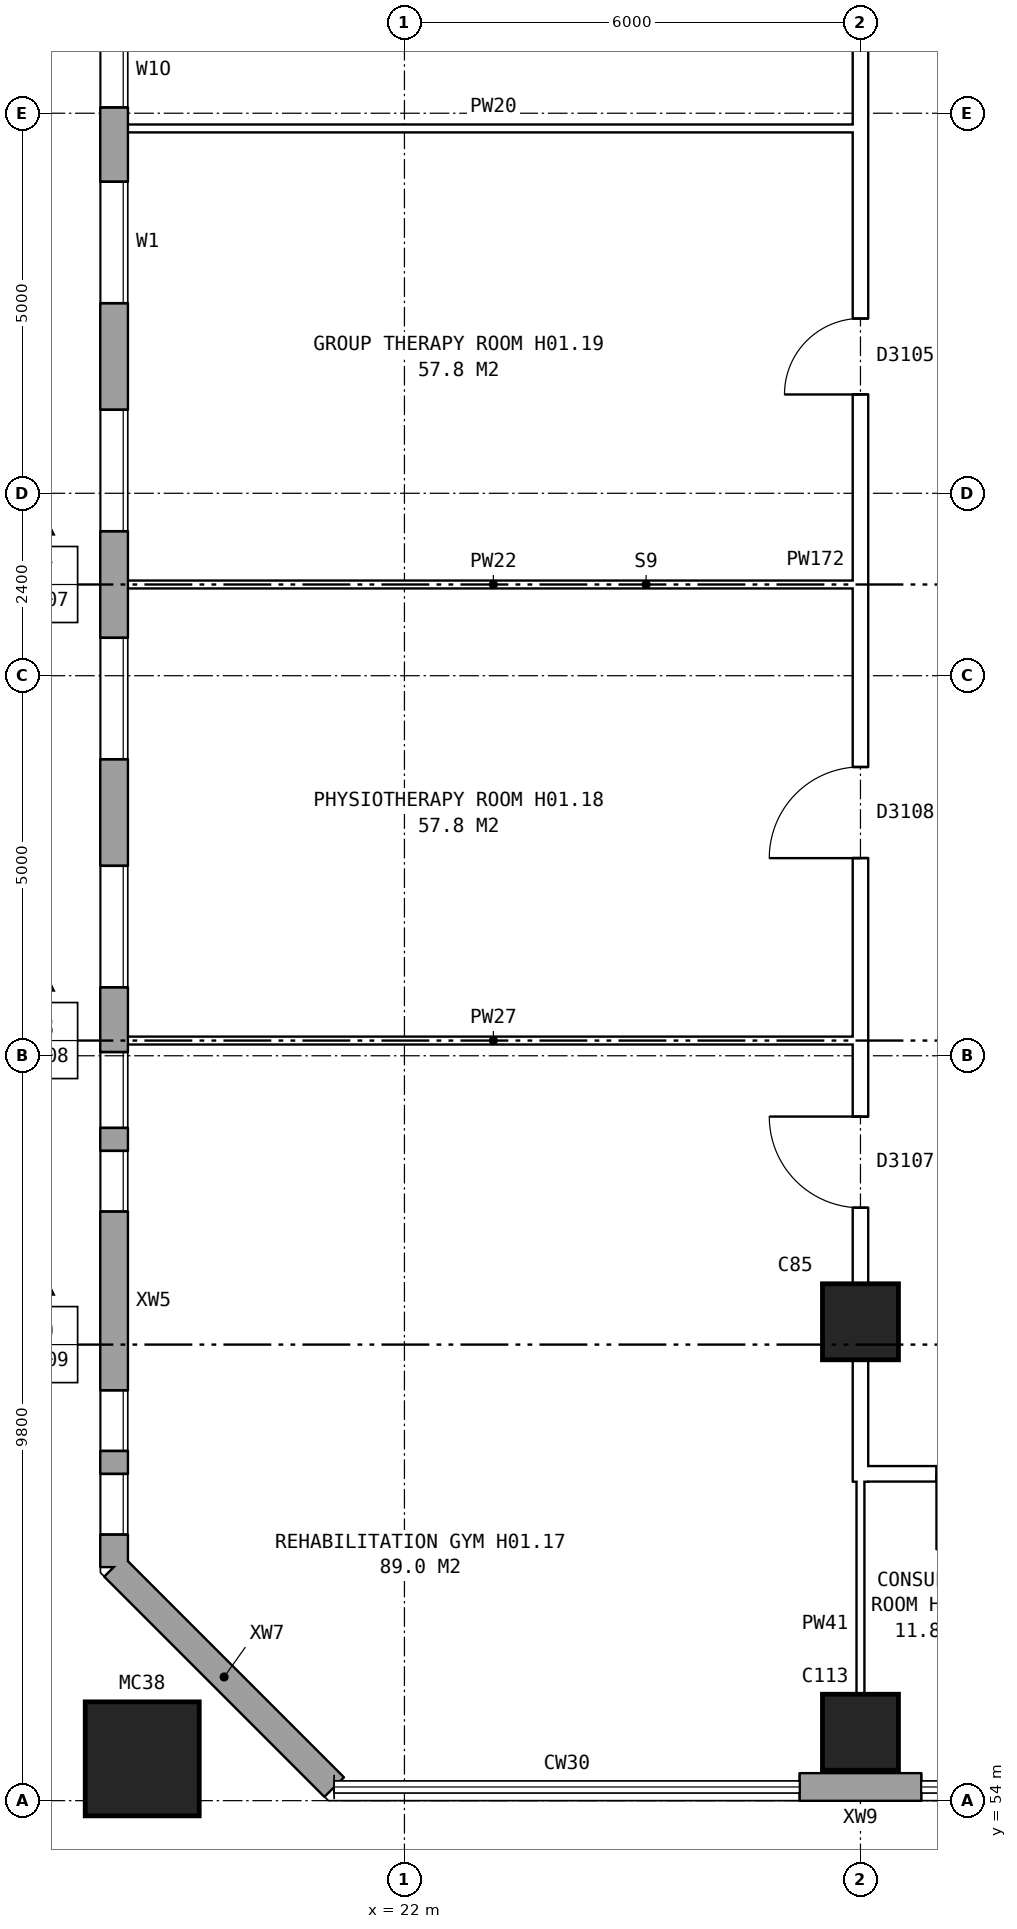
"""IFC4 building model, lengths in metres.
Left out: names, types, materials, properties, quantities, classifications, styles, units other than length and angle.
Written with IfcOpenShell. Run it as: python <this file> out.ifc"""

import sys

from ifc_helpers import new_model, si_unit, direction, frame, frame_2d, origin, origin_2d, place, context, subcontext, project, spatial, rectangle, hollow_rectangle, extrude, element, fill, save


model = new_model("IFC4")
c1 = context("Model", 3, precision=1e-05, world=origin(), true_north=direction((0.0, 1.0)))
c2 = subcontext(c1, "Body", "Model", "MODEL_VIEW")
j1 = project(units=[si_unit("LENGTHUNIT", "METRE"), si_unit("PLANEANGLEUNIT", "RADIAN")], contexts=[c1])
p1 = place(None, origin())
s1 = spatial("IfcSite", under=j1, at=p1, CompositionType="ELEMENT")
p2 = place(p1, origin())
s2 = spatial("IfcBuilding", under=s1, at=p2, CompositionType="ELEMENT")
p3 = place(p2, frame((0.0, 0.0, 5.5)))
s3 = spatial("IfcBuildingStorey", under=s2, at=p3, CompositionType="ELEMENT", Elevation=5.5)
for number, where, z_axis, x_axis in (
    (1, (28.0, 54.9, 0.0), (0.0, 0.0, 1.0), (1.0, 0.0, 0.0)),
    (2, (28.0, 60.3, 0.0), (0.0, 0.0, 1.0), (1.0, 0.0, 0.0)),
):
    element("IfcColumn", number, at=place(p3, frame(where, z_axis=z_axis, x_axis=x_axis)), inside=s3, PredefinedType="COLUMN", context=c2, shape_type="SweptSolid", body=[
        extrude(rectangle(XDim=1.0, YDim=1.0, at=origin_2d()), origin(), (0.0, 0.0, 1.0), 4.3),
    ])
p4 = place(p3, frame((18.55, 54.55, 0.0), z_axis=(0.0, 0.0, 1.0), x_axis=(1.0, 0.0, 0.0)))
e3 = element("IfcColumn", 3, at=p4, inside=s3, PredefinedType="COLUMN", context=c2, shape_type="SweptSolid", body=[
    extrude(hollow_rectangle(XDim=1.5, YDim=1.5, WallThickness=0.08, at=origin_2d()), origin(), (0.0, 0.0, 1.0), 4.6),
])
p5 = place(p3, frame((18.18, 57.075, 0.0), z_axis=(0.0, 0.0, 1.0), x_axis=(0.707106781187, -0.707106781187, 0.0)))
e4 = element("IfcWall", 4, at=p5, inside=s3, PredefinedType="STANDARD", context=c2, shape_type="SweptSolid", body=[
    extrude(rectangle(XDim=4.094, YDim=0.36, at=frame_2d((2.047, 0.0))), origin(), (0.0, 0.0, 1.0), 4.3),
])
p6 = place(p3, frame((27.2, 54.18, 0.0), z_axis=(0.0, 0.0, 1.0), x_axis=(1.0, 0.0, 0.0)))
e5 = element("IfcWall", 5, at=p6, inside=s3, PredefinedType="STANDARD", context=c2, shape_type="SweptSolid", body=[
    extrude(rectangle(XDim=1.6, YDim=0.36, at=frame_2d((0.8, 0.0))), origin(), (0.0, 0.0, 1.0), 4.3),
])
p7 = place(p3, frame((18.18, 82.925, 0.0), z_axis=(0.0, 0.0, 1.0), x_axis=(0.0, -1.0, 0.0)))
e6 = element("IfcWall", 6, at=p7, inside=s3, PredefinedType="STANDARD", context=c2, shape_type="SweptSolid", body=[
    extrude(rectangle(XDim=25.851, YDim=0.36, at=frame_2d((12.925, 0.0))), origin(), (0.0, 0.0, 1.0), 4.3),
])
p8 = place(p7, frame((0.3, 0.0, 1.4)))
e7 = element("IfcOpeningElement", 7, at=p8, cuts=e6, PredefinedType="OPENING", context=c2, shape_type="SweptSolid", body=[
    extrude(rectangle(XDim=0.8, YDim=1.2, at=frame_2d((0.4, 0.6))), frame((0.0, 0.19, 0.0), z_axis=(0.0, -1.0, 0.0), x_axis=(1.0, 0.0, 0.0)), (0.0, 0.0, 1.0), 0.38),
])
p9 = place(p7, frame((1.4, 0.0, 1.7)))
e8 = element("IfcOpeningElement", 8, at=p9, cuts=e6, PredefinedType="OPENING", context=c2, shape_type="SweptSolid", body=[
    extrude(rectangle(XDim=0.8, YDim=0.9, at=frame_2d((0.4, 0.45))), frame((0.0, 0.19, 0.0), z_axis=(0.0, -1.0, 0.0), x_axis=(1.0, 0.0, 0.0)), (0.0, 0.0, 1.0), 0.38),
])
p10 = place(p7, frame((7.625, 0.0, 0.8)))
e9 = element("IfcOpeningElement", 9, at=p10, cuts=e6, PredefinedType="OPENING", context=c2, shape_type="SweptSolid", body=[
    extrude(rectangle(XDim=1.6, YDim=1.8, at=frame_2d((0.8, 0.9))), frame((0.0, 0.19, 0.0), z_axis=(0.0, -1.0, 0.0), x_axis=(1.0, 0.0, 0.0)), (0.0, 0.0, 1.0), 0.38),
])
p11 = place(p7, frame((10.625, 0.0, 0.8)))
e10 = element("IfcOpeningElement", 10, at=p11, cuts=e6, PredefinedType="OPENING", context=c2, shape_type="SweptSolid", body=[
    extrude(rectangle(XDim=1.6, YDim=1.8, at=frame_2d((0.8, 0.9))), frame((0.0, 0.19, 0.0), z_axis=(0.0, -1.0, 0.0), x_axis=(1.0, 0.0, 0.0)), (0.0, 0.0, 1.0), 0.38),
])
p12 = place(p7, frame((13.625, 0.0, 0.8)))
e11 = element("IfcOpeningElement", 11, at=p12, cuts=e6, PredefinedType="OPENING", context=c2, shape_type="SweptSolid", body=[
    extrude(rectangle(XDim=1.6, YDim=1.8, at=frame_2d((0.8, 0.9))), frame((0.0, 0.19, 0.0), z_axis=(0.0, -1.0, 0.0), x_axis=(1.0, 0.0, 0.0)), (0.0, 0.0, 1.0), 0.38),
])
p13 = place(p7, frame((16.625, 0.0, 0.8)))
e12 = element("IfcOpeningElement", 12, at=p13, cuts=e6, PredefinedType="OPENING", context=c2, shape_type="SweptSolid", body=[
    extrude(rectangle(XDim=1.6, YDim=1.8, at=frame_2d((0.8, 0.9))), frame((0.0, 0.19, 0.0), z_axis=(0.0, -1.0, 0.0), x_axis=(1.0, 0.0, 0.0)), (0.0, 0.0, 1.0), 0.38),
])
p14 = place(p7, frame((19.075, 0.0, 0.8)))
e13 = element("IfcOpeningElement", 13, at=p14, cuts=e6, PredefinedType="OPENING", context=c2, shape_type="SweptSolid", body=[
    extrude(rectangle(XDim=1.0, YDim=1.2, at=frame_2d((0.5, 0.6))), frame((0.0, 0.19, 0.0), z_axis=(0.0, -1.0, 0.0), x_axis=(1.0, 0.0, 0.0)), (0.0, 0.0, 1.0), 0.38),
])
p15 = place(p7, frame((20.375, 0.0, 0.8)))
e14 = element("IfcOpeningElement", 14, at=p15, cuts=e6, PredefinedType="OPENING", context=c2, shape_type="SweptSolid", body=[
    extrude(rectangle(XDim=0.8, YDim=0.9, at=frame_2d((0.4, 0.45))), frame((0.0, 0.19, 0.0), z_axis=(0.0, -1.0, 0.0), x_axis=(1.0, 0.0, 0.0)), (0.0, 0.0, 1.0), 0.38),
])
p16 = place(p7, frame((4.55, 0.0, 0.8)))
e15 = element("IfcOpeningElement", 15, at=p16, cuts=e6, PredefinedType="OPENING", context=c2, shape_type="SweptSolid", body=[
    extrude(rectangle(XDim=0.8, YDim=0.9, at=frame_2d((0.4, 0.45))), frame((0.0, 0.19, 0.0), z_axis=(0.0, -1.0, 0.0), x_axis=(1.0, 0.0, 0.0)), (0.0, 0.0, 1.0), 0.38),
])
p17 = place(p7, frame((5.65, 0.0, 0.8)))
e16 = element("IfcOpeningElement", 16, at=p17, cuts=e6, PredefinedType="OPENING", context=c2, shape_type="SweptSolid", body=[
    extrude(rectangle(XDim=1.0, YDim=1.2, at=frame_2d((0.5, 0.6))), frame((0.0, 0.19, 0.0), z_axis=(0.0, -1.0, 0.0), x_axis=(1.0, 0.0, 0.0)), (0.0, 0.0, 1.0), 0.38),
])
p18 = place(p7, frame((23.525, 0.0, 1.7)))
e17 = element("IfcOpeningElement", 17, at=p18, cuts=e6, PredefinedType="OPENING", context=c2, shape_type="SweptSolid", body=[
    extrude(rectangle(XDim=0.8, YDim=0.9, at=frame_2d((0.4, 0.45))), frame((0.0, 0.19, 0.0), z_axis=(0.0, -1.0, 0.0), x_axis=(1.0, 0.0, 0.0)), (0.0, 0.0, 1.0), 0.38),
])
p19 = place(p7, frame((24.625, 0.0, 1.4)))
e18 = element("IfcOpeningElement", 18, at=p19, cuts=e6, PredefinedType="OPENING", context=c2, shape_type="SweptSolid", body=[
    extrude(rectangle(XDim=0.8, YDim=1.2, at=frame_2d((0.4, 0.6))), frame((0.0, 0.19, 0.0), z_axis=(0.0, -1.0, 0.0), x_axis=(1.0, 0.0, 0.0)), (0.0, 0.0, 1.0), 0.38),
])
p20 = place(p3, frame((27.9, 58.3, 0.0), z_axis=(0.0, 0.0, 1.0), x_axis=(1.0, 0.0, 0.0)))
e19 = element("IfcWall", 19, at=p20, inside=s3, PredefinedType="PARTITIONING", context=c2, shape_type="SweptSolid", body=[
    extrude(rectangle(XDim=16.12, YDim=0.2, at=frame_2d((8.06, 0.0))), origin(), (0.0, 0.0, 1.0), 4.3),
])
p21 = place(p20, frame((1.1, 0.0, 0.0)))
e20 = element("IfcOpeningElement", 20, at=p21, cuts=e19, PredefinedType="OPENING", context=c2, shape_type="SweptSolid", body=[
    extrude(rectangle(XDim=1.0, YDim=2.1, at=frame_2d((0.5, 1.05))), frame((0.0, 0.11, 0.0), z_axis=(0.0, -1.0, 0.0), x_axis=(1.0, 0.0, 0.0)), (0.0, 0.0, 1.0), 0.22),
])
p22 = place(p20, frame((4.1, 0.0, 0.0)))
e21 = element("IfcOpeningElement", 21, at=p22, cuts=e19, PredefinedType="OPENING", context=c2, shape_type="SweptSolid", body=[
    extrude(rectangle(XDim=1.0, YDim=2.1, at=frame_2d((0.5, 1.05))), frame((0.0, 0.11, 0.0), z_axis=(0.0, -1.0, 0.0), x_axis=(1.0, 0.0, 0.0)), (0.0, 0.0, 1.0), 0.22),
])
p23 = place(p20, frame((7.1, 0.0, 0.0)))
e22 = element("IfcOpeningElement", 22, at=p23, cuts=e19, PredefinedType="OPENING", context=c2, shape_type="SweptSolid", body=[
    extrude(rectangle(XDim=1.0, YDim=2.1, at=frame_2d((0.5, 1.05))), frame((0.0, 0.11, 0.0), z_axis=(0.0, -1.0, 0.0), x_axis=(1.0, 0.0, 0.0)), (0.0, 0.0, 1.0), 0.22),
])
p24 = place(p20, frame((10.1, 0.0, 0.0)))
e23 = element("IfcOpeningElement", 23, at=p24, cuts=e19, PredefinedType="OPENING", context=c2, shape_type="SweptSolid", body=[
    extrude(rectangle(XDim=1.0, YDim=2.1, at=frame_2d((0.5, 1.05))), frame((0.0, 0.11, 0.0), z_axis=(0.0, -1.0, 0.0), x_axis=(1.0, 0.0, 0.0)), (0.0, 0.0, 1.0), 0.22),
])
p25 = place(p20, frame((13.55, 0.0, 0.0)))
e24 = element("IfcOpeningElement", 24, at=p25, cuts=e19, PredefinedType="OPENING", context=c2, shape_type="SweptSolid", body=[
    extrude(rectangle(XDim=1.0, YDim=2.1, at=frame_2d((0.5, 1.05))), frame((0.0, 0.11, 0.0), z_axis=(0.0, -1.0, 0.0), x_axis=(1.0, 0.0, 0.0)), (0.0, 0.0, 1.0), 0.22),
])
for number, where, z_axis, x_axis in (
    (25, (18.24, 64.0, 0.0), (0.0, 0.0, 1.0), (1.0, 0.0, 0.0)),
    (26, (18.24, 70.0, 0.0), (0.0, 0.0, 1.0), (1.0, 0.0, 0.0)),
    (27, (18.24, 76.0, 0.0), (0.0, 0.0, 1.0), (1.0, 0.0, 0.0)),
):
    element("IfcWall", number, at=place(p3, frame(where, z_axis=z_axis, x_axis=x_axis)), inside=s3, PredefinedType="PARTITIONING", context=c2, shape_type="SweptSolid", body=[
        extrude(rectangle(XDim=9.86, YDim=0.1, at=frame_2d((4.93, 0.0))), origin(), (0.0, 0.0, 1.0), 4.3),
    ])
p26 = place(p3, frame((28.0, 58.198, 0.0), z_axis=(0.0, 0.0, 1.0), x_axis=(0.0, 1.0, 0.0)))
e28 = element("IfcWall", 28, at=p26, inside=s3, PredefinedType="PARTITIONING", context=c2, shape_type="SweptSolid", body=[
    extrude(rectangle(XDim=23.604, YDim=0.2, at=frame_2d((11.802, 0.0))), origin(), (0.0, 0.0, 1.0), 4.3),
])
p27 = place(p26, frame((3.602, 0.0, 0.0)))
e29 = element("IfcOpeningElement", 29, at=p27, cuts=e28, PredefinedType="OPENING", context=c2, shape_type="SweptSolid", body=[
    extrude(rectangle(XDim=1.2, YDim=2.1, at=frame_2d((0.6, 1.05))), frame((0.0, 0.11, 0.0), z_axis=(0.0, -1.0, 0.0), x_axis=(1.0, 0.0, 0.0)), (0.0, 0.0, 1.0), 0.22),
])
p28 = place(p26, frame((8.202, 0.0, 0.0)))
e30 = element("IfcOpeningElement", 30, at=p28, cuts=e28, PredefinedType="OPENING", context=c2, shape_type="SweptSolid", body=[
    extrude(rectangle(XDim=1.2, YDim=2.1, at=frame_2d((0.6, 1.05))), frame((0.0, 0.11, 0.0), z_axis=(0.0, -1.0, 0.0), x_axis=(1.0, 0.0, 0.0)), (0.0, 0.0, 1.0), 0.22),
])
p29 = place(p26, frame((14.302, 0.0, 0.0)))
e31 = element("IfcOpeningElement", 31, at=p29, cuts=e28, PredefinedType="OPENING", context=c2, shape_type="SweptSolid", body=[
    extrude(rectangle(XDim=1.0, YDim=2.1, at=frame_2d((0.5, 1.05))), frame((0.0, 0.11, 0.0), z_axis=(0.0, -1.0, 0.0), x_axis=(1.0, 0.0, 0.0)), (0.0, 0.0, 1.0), 0.22),
])
p30 = place(p26, frame((18.902, 0.0, 0.0)))
e32 = element("IfcOpeningElement", 32, at=p30, cuts=e28, PredefinedType="OPENING", context=c2, shape_type="SweptSolid", body=[
    extrude(rectangle(XDim=1.0, YDim=2.1, at=frame_2d((0.5, 1.05))), frame((0.0, 0.11, 0.0), z_axis=(0.0, -1.0, 0.0), x_axis=(1.0, 0.0, 0.0)), (0.0, 0.0, 1.0), 0.22),
])
p31 = place(p3, frame((28.0, 54.24, 0.0), z_axis=(0.0, 0.0, 1.0), x_axis=(0.0, 1.0, 0.0)))
e33 = element("IfcWall", 33, at=p31, inside=s3, PredefinedType="PARTITIONING", context=c2, shape_type="SweptSolid", body=[
    extrude(rectangle(XDim=4.162, YDim=0.1, at=frame_2d((2.081, 0.0))), origin(), (0.0, 0.0, 1.0), 4.3),
])
p32 = place(p10, origin())
e34 = element("IfcWindow", 34, at=p32, inside=s3, PartitioningType="SINGLE_PANEL", PredefinedType="WINDOW", context=c2, shape_type="SweptSolid", body=[
    extrude(rectangle(XDim=1.6, YDim=1.8, at=frame_2d((0.8, 0.9))), frame((0.0, 0.15, 0.0), z_axis=(0.0, -1.0, 0.0), x_axis=(1.0, 0.0, 0.0)), (0.0, 0.0, 1.0), 0.06),
])
fill(e9, e34)
p33 = place(p11, origin())
e35 = element("IfcWindow", 35, at=p33, inside=s3, PartitioningType="SINGLE_PANEL", PredefinedType="WINDOW", context=c2, shape_type="SweptSolid", body=[
    extrude(rectangle(XDim=1.6, YDim=1.8, at=frame_2d((0.8, 0.9))), frame((0.0, 0.15, 0.0), z_axis=(0.0, -1.0, 0.0), x_axis=(1.0, 0.0, 0.0)), (0.0, 0.0, 1.0), 0.06),
])
fill(e10, e35)
p34 = place(p12, origin())
e36 = element("IfcWindow", 36, at=p34, inside=s3, PartitioningType="SINGLE_PANEL", PredefinedType="WINDOW", context=c2, shape_type="SweptSolid", body=[
    extrude(rectangle(XDim=1.6, YDim=1.8, at=frame_2d((0.8, 0.9))), frame((0.0, 0.15, 0.0), z_axis=(0.0, -1.0, 0.0), x_axis=(1.0, 0.0, 0.0)), (0.0, 0.0, 1.0), 0.06),
])
fill(e11, e36)
p35 = place(p13, origin())
e37 = element("IfcWindow", 37, at=p35, inside=s3, PartitioningType="SINGLE_PANEL", PredefinedType="WINDOW", context=c2, shape_type="SweptSolid", body=[
    extrude(rectangle(XDim=1.6, YDim=1.8, at=frame_2d((0.8, 0.9))), frame((0.0, 0.15, 0.0), z_axis=(0.0, -1.0, 0.0), x_axis=(1.0, 0.0, 0.0)), (0.0, 0.0, 1.0), 0.06),
])
fill(e12, e37)
p36 = place(p14, origin())
e38 = element("IfcWindow", 38, at=p36, inside=s3, PartitioningType="SINGLE_PANEL", PredefinedType="WINDOW", context=c2, shape_type="SweptSolid", body=[
    extrude(rectangle(XDim=1.0, YDim=1.2, at=frame_2d((0.5, 0.6))), frame((0.0, 0.15, 0.0), z_axis=(0.0, -1.0, 0.0), x_axis=(1.0, 0.0, 0.0)), (0.0, 0.0, 1.0), 0.06),
])
fill(e13, e38)
p37 = place(p15, origin())
e39 = element("IfcWindow", 39, at=p37, inside=s3, PartitioningType="SINGLE_PANEL", PredefinedType="WINDOW", context=c2, shape_type="SweptSolid", body=[
    extrude(rectangle(XDim=0.8, YDim=0.9, at=frame_2d((0.4, 0.45))), frame((0.0, 0.15, 0.0), z_axis=(0.0, -1.0, 0.0), x_axis=(1.0, 0.0, 0.0)), (0.0, 0.0, 1.0), 0.06),
])
fill(e14, e39)
p38 = place(p27, origin())
e40 = element("IfcDoor", 40, at=p38, inside=s3, OperationType="SINGLE_SWING_RIGHT", PredefinedType="DOOR", context=c2, shape_type="SweptSolid", body=[
    extrude(rectangle(XDim=1.2, YDim=2.1, at=frame_2d((0.6, 1.05))), frame((0.0, 0.025, 0.0), z_axis=(0.0, -1.0, 0.0), x_axis=(1.0, 0.0, 0.0)), (0.0, 0.0, 1.0), 0.05),
])
fill(e29, e40)
p39 = place(p28, origin())
e41 = element("IfcDoor", 41, at=p39, inside=s3, OperationType="SINGLE_SWING_LEFT", PredefinedType="DOOR", context=c2, shape_type="SweptSolid", body=[
    extrude(rectangle(XDim=1.2, YDim=2.1, at=frame_2d((0.6, 1.05))), frame((0.0, 0.025, 0.0), z_axis=(0.0, -1.0, 0.0), x_axis=(1.0, 0.0, 0.0)), (0.0, 0.0, 1.0), 0.05),
])
fill(e30, e41)
p40 = place(p29, origin())
e42 = element("IfcDoor", 42, at=p40, inside=s3, OperationType="SINGLE_SWING_LEFT", PredefinedType="DOOR", context=c2, shape_type="SweptSolid", body=[
    extrude(rectangle(XDim=1.0, YDim=2.1, at=frame_2d((0.5, 1.05))), frame((0.0, 0.025, 0.0), z_axis=(0.0, -1.0, 0.0), x_axis=(1.0, 0.0, 0.0)), (0.0, 0.0, 1.0), 0.05),
])
fill(e31, e42)
p41 = place(p17, origin())
e43 = element("IfcWindow", 43, at=p41, inside=s3, PartitioningType="SINGLE_PANEL", PredefinedType="WINDOW", context=c2, shape_type="SweptSolid", body=[
    extrude(rectangle(XDim=1.0, YDim=1.2, at=frame_2d((0.5, 0.6))), frame((0.0, 0.15, 0.0), z_axis=(0.0, -1.0, 0.0), x_axis=(1.0, 0.0, 0.0)), (0.0, 0.0, 1.0), 0.06),
])
fill(e16, e43)
p42 = place(p18, origin())
e44 = element("IfcWindow", 44, at=p42, inside=s3, PartitioningType="SINGLE_PANEL", PredefinedType="WINDOW", context=c2, shape_type="SweptSolid", body=[
    extrude(rectangle(XDim=0.8, YDim=0.9, at=frame_2d((0.4, 0.45))), frame((0.0, 0.15, 0.0), z_axis=(0.0, -1.0, 0.0), x_axis=(1.0, 0.0, 0.0)), (0.0, 0.0, 1.0), 0.06),
])
fill(e17, e44)
p43 = place(p19, origin())
e45 = element("IfcWindow", 45, at=p43, inside=s3, PartitioningType="SINGLE_PANEL", PredefinedType="WINDOW", context=c2, shape_type="SweptSolid", body=[
    extrude(rectangle(XDim=0.8, YDim=1.2, at=frame_2d((0.4, 0.6))), frame((0.0, 0.15, 0.0), z_axis=(0.0, -1.0, 0.0), x_axis=(1.0, 0.0, 0.0)), (0.0, 0.0, 1.0), 0.06),
])
fill(e18, e45)
save(model, sys.argv[1])
